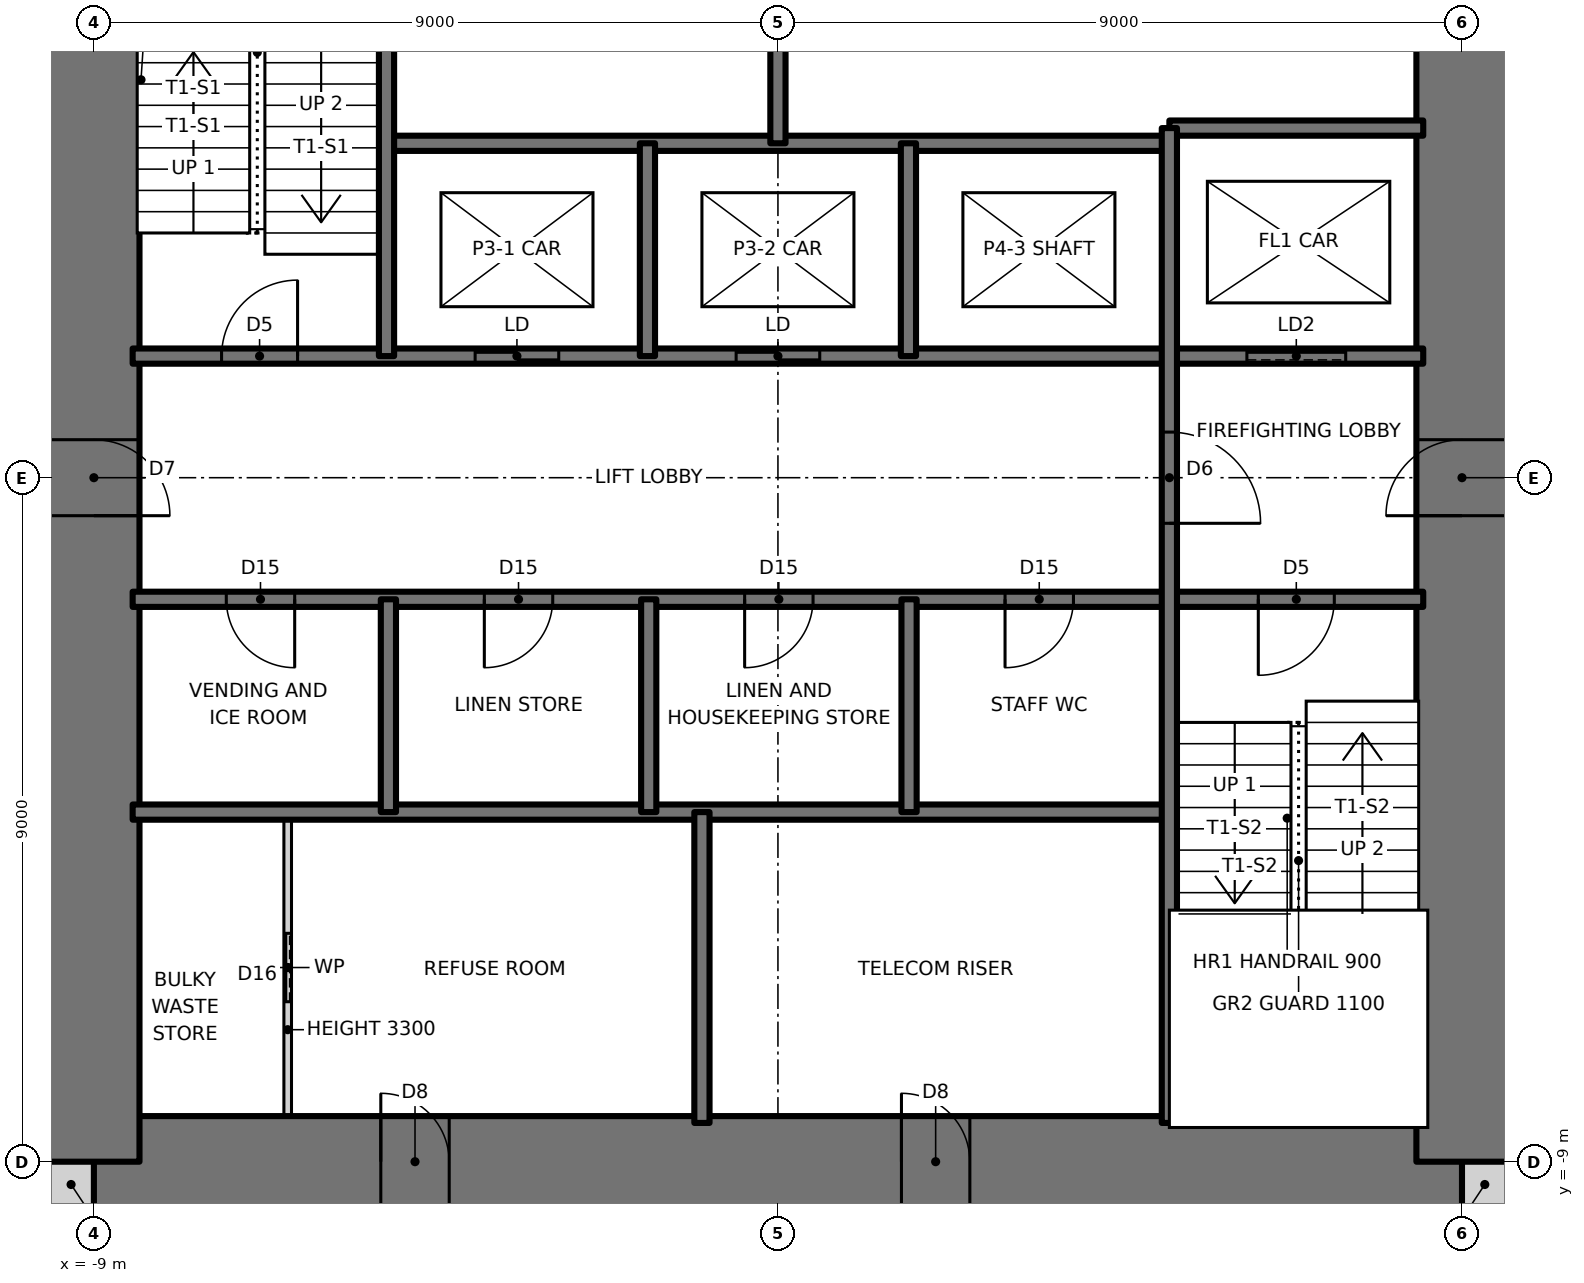
"""IFC4 building model, lengths in metres.
Left out: names, types, materials, properties, quantities, classifications, styles, units other than length and angle.
Written with IfcOpenShell. Run it as: python <this file> out.ifc"""

import sys

from ifc_helpers import new_model, si_unit, direction, frame, frame_2d, origin, place, context, subcontext, project, spatial, rectangle, extrude, element, fill, save


model = new_model("IFC4")
c1 = context("Model", 3, precision=1e-05, world=origin(), true_north=direction((0.0, 1.0)))
c2 = subcontext(c1, "Body", "Model", "MODEL_VIEW")
j1 = project(units=[si_unit("LENGTHUNIT", "METRE"), si_unit("PLANEANGLEUNIT", "RADIAN")], contexts=[c1])
p1 = place(None, origin())
s1 = spatial("IfcSite", under=j1, at=p1, CompositionType="ELEMENT")
p2 = place(p1, origin())
s2 = spatial("IfcBuilding", under=s1, at=p2, CompositionType="ELEMENT")
p3 = place(p2, frame((0.0, 0.0, 160.0)))
s3 = spatial("IfcBuildingStorey", under=s2, at=p3, CompositionType="ELEMENT", Elevation=160.0)
for number, where, z_axis, x_axis in (
    (1, (-9.6, -9.3, 0.0), (0.0, 0.0, 1.0), (1.0, 0.0, 0.0)),
    (2, (9.0, -9.3, 0.0), (0.0, 0.0, 1.0), (1.0, 0.0, 0.0)),
):
    element("IfcWall", number, at=place(p3, frame(where, z_axis=z_axis, x_axis=x_axis)), inside=s3, PredefinedType="SOLIDWALL", context=c2, shape_type="SweptSolid", body=[
        extrude(rectangle(XDim=0.6, YDim=0.6, at=frame_2d((0.3, 0.0))), origin(), (0.0, 0.0, 1.0), 3.5),
    ])
p4 = place(p3, frame((-9.0, -9.0, 0.0), z_axis=(0.0, 0.0, 1.0), x_axis=(1.0, 0.0, 0.0)))
e3 = element("IfcWall", 3, at=p4, inside=s3, PredefinedType="SHEAR", context=c2, shape_type="SweptSolid", body=[
    extrude(rectangle(XDim=18.0, YDim=1.2, at=frame_2d((9.0, 0.0))), origin(), (0.0, 0.0, 1.0), 3.5),
])
p5 = place(p4, frame((3.775, 0.0, 0.0)))
e4 = element("IfcOpeningElement", 4, at=p5, cuts=e3, PredefinedType="OPENING", context=c2, shape_type="SweptSolid", body=[
    extrude(rectangle(XDim=0.9, YDim=2.1, at=frame_2d((0.45, 1.05))), frame((0.0, 0.61, 0.0), z_axis=(0.0, -1.0, 0.0), x_axis=(1.0, 0.0, 0.0)), (0.0, 0.0, 1.0), 1.22),
])
p6 = place(p4, frame((10.625, 0.0, 0.0)))
e5 = element("IfcOpeningElement", 5, at=p6, cuts=e3, PredefinedType="OPENING", context=c2, shape_type="SweptSolid", body=[
    extrude(rectangle(XDim=0.9, YDim=2.1, at=frame_2d((0.45, 1.05))), frame((0.0, 0.61, 0.0), z_axis=(0.0, -1.0, 0.0), x_axis=(1.0, 0.0, 0.0)), (0.0, 0.0, 1.0), 1.22),
])
p7 = place(p3, frame((9.0, -9.0, 0.0), z_axis=(0.0, 0.0, 1.0), x_axis=(0.0, 1.0, 0.0)))
e6 = element("IfcWall", 6, at=p7, inside=s3, PredefinedType="SHEAR", context=c2, shape_type="SweptSolid", body=[
    extrude(rectangle(XDim=18.0, YDim=1.2, at=frame_2d((9.0, 0.0))), origin(), (0.0, 0.0, 1.0), 3.5),
])
p8 = place(p7, frame((8.5, 0.0, 0.0)))
e7 = element("IfcOpeningElement", 7, at=p8, cuts=e6, PredefinedType="OPENING", context=c2, shape_type="SweptSolid", body=[
    extrude(rectangle(XDim=1.0, YDim=2.1, at=frame_2d((0.5, 1.05))), frame((0.0, 0.61, 0.0), z_axis=(0.0, -1.0, 0.0), x_axis=(1.0, 0.0, 0.0)), (0.0, 0.0, 1.0), 1.22),
])
p9 = place(p3, frame((-9.0, 9.0, 0.0), z_axis=(0.0, 0.0, 1.0), x_axis=(0.0, -1.0, 0.0)))
e8 = element("IfcWall", 8, at=p9, inside=s3, PredefinedType="SHEAR", context=c2, shape_type="SweptSolid", body=[
    extrude(rectangle(XDim=18.0, YDim=1.2, at=frame_2d((9.0, 0.0))), origin(), (0.0, 0.0, 1.0), 3.5),
])
p10 = place(p9, frame((8.5, 0.0, 0.0)))
e9 = element("IfcOpeningElement", 9, at=p10, cuts=e8, PredefinedType="OPENING", context=c2, shape_type="SweptSolid", body=[
    extrude(rectangle(XDim=1.0, YDim=2.1, at=frame_2d((0.5, 1.05))), frame((0.0, 0.61, 0.0), z_axis=(0.0, -1.0, 0.0), x_axis=(1.0, 0.0, 0.0)), (0.0, 0.0, 1.0), 1.22),
])
p11 = place(p3, frame((-8.49, -4.4, 0.0), z_axis=(0.0, 0.0, 1.0), x_axis=(1.0, 0.0, 0.0)))
e10 = element("IfcWall", 10, at=p11, inside=s3, PredefinedType="SOLIDWALL", context=c2, shape_type="SweptSolid", body=[
    extrude(rectangle(XDim=13.64, YDim=0.2, at=frame_2d((6.82, 0.0))), origin(), (0.0, 0.0, 1.0), 3.5),
])
p12 = place(p3, frame((-8.49, -1.6, 0.0), z_axis=(0.0, 0.0, 1.0), x_axis=(1.0, 0.0, 0.0)))
e11 = element("IfcWall", 11, at=p12, inside=s3, PredefinedType="SOLIDWALL", context=c2, shape_type="SweptSolid", body=[
    extrude(rectangle(XDim=16.98, YDim=0.2, at=frame_2d((8.49, 0.0))), origin(), (0.0, 0.0, 1.0), 3.5),
])
p13 = place(p12, frame((14.81, 0.0, 0.0)))
e12 = element("IfcOpeningElement", 12, at=p13, cuts=e11, PredefinedType="OPENING", context=c2, shape_type="SweptSolid", body=[
    extrude(rectangle(XDim=1.0, YDim=2.1, at=frame_2d((0.5, 1.05))), frame((0.0, 0.11, 0.0), z_axis=(0.0, -1.0, 0.0), x_axis=(1.0, 0.0, 0.0)), (0.0, 0.0, 1.0), 0.22),
])
p14 = place(p12, frame((1.232, 0.0, 0.0)))
e13 = element("IfcOpeningElement", 13, at=p14, cuts=e11, PredefinedType="OPENING", context=c2, shape_type="SweptSolid", body=[
    extrude(rectangle(XDim=0.9, YDim=2.1, at=frame_2d((0.45, 1.05))), frame((0.0, 0.11, 0.0), z_axis=(0.0, -1.0, 0.0), x_axis=(1.0, 0.0, 0.0)), (0.0, 0.0, 1.0), 0.22),
])
p15 = place(p12, frame((4.627, 0.0, 0.0)))
e14 = element("IfcOpeningElement", 14, at=p15, cuts=e11, PredefinedType="OPENING", context=c2, shape_type="SweptSolid", body=[
    extrude(rectangle(XDim=0.9, YDim=2.1, at=frame_2d((0.45, 1.05))), frame((0.0, 0.11, 0.0), z_axis=(0.0, -1.0, 0.0), x_axis=(1.0, 0.0, 0.0)), (0.0, 0.0, 1.0), 0.22),
])
p16 = place(p12, frame((8.052, 0.0, 0.0)))
e15 = element("IfcOpeningElement", 15, at=p16, cuts=e11, PredefinedType="OPENING", context=c2, shape_type="SweptSolid", body=[
    extrude(rectangle(XDim=0.9, YDim=2.1, at=frame_2d((0.45, 1.05))), frame((0.0, 0.11, 0.0), z_axis=(0.0, -1.0, 0.0), x_axis=(1.0, 0.0, 0.0)), (0.0, 0.0, 1.0), 0.22),
])
p17 = place(p12, frame((11.478, 0.0, 0.0)))
e16 = element("IfcOpeningElement", 16, at=p17, cuts=e11, PredefinedType="OPENING", context=c2, shape_type="SweptSolid", body=[
    extrude(rectangle(XDim=0.9, YDim=2.1, at=frame_2d((0.45, 1.05))), frame((0.0, 0.11, 0.0), z_axis=(0.0, -1.0, 0.0), x_axis=(1.0, 0.0, 0.0)), (0.0, 0.0, 1.0), 0.22),
])
p18 = place(p3, frame((-8.49, 1.6, 0.0), z_axis=(0.0, 0.0, 1.0), x_axis=(1.0, 0.0, 0.0)))
e17 = element("IfcWall", 17, at=p18, inside=s3, PredefinedType="SOLIDWALL", context=c2, shape_type="SweptSolid", body=[
    extrude(rectangle(XDim=16.98, YDim=0.2, at=frame_2d((8.49, 0.0))), origin(), (0.0, 0.0, 1.0), 3.5),
])
p19 = place(p18, frame((1.17, 0.0, 0.0)))
e18 = element("IfcOpeningElement", 18, at=p19, cuts=e17, PredefinedType="OPENING", context=c2, shape_type="SweptSolid", body=[
    extrude(rectangle(XDim=1.0, YDim=2.1, at=frame_2d((0.5, 1.05))), frame((0.0, 0.11, 0.0), z_axis=(0.0, -1.0, 0.0), x_axis=(1.0, 0.0, 0.0)), (0.0, 0.0, 1.0), 0.22),
])
p20 = place(p18, frame((4.506, 0.0, 0.0)))
e19 = element("IfcOpeningElement", 19, at=p20, cuts=e17, PredefinedType="OPENING", context=c2, shape_type="SweptSolid", body=[
    extrude(rectangle(XDim=1.1, YDim=2.1, at=frame_2d((0.55, 1.05))), frame((0.0, 0.11, 0.0), z_axis=(0.0, -1.0, 0.0), x_axis=(1.0, 0.0, 0.0)), (0.0, 0.0, 1.0), 0.22),
])
p21 = place(p18, frame((7.94, 0.0, 0.0)))
e20 = element("IfcOpeningElement", 20, at=p21, cuts=e17, PredefinedType="OPENING", context=c2, shape_type="SweptSolid", body=[
    extrude(rectangle(XDim=1.1, YDim=2.1, at=frame_2d((0.55, 1.05))), frame((0.0, 0.11, 0.0), z_axis=(0.0, -1.0, 0.0), x_axis=(1.0, 0.0, 0.0)), (0.0, 0.0, 1.0), 0.22),
])
p22 = place(p18, frame((14.66, 0.0, 0.0)))
e21 = element("IfcOpeningElement", 21, at=p22, cuts=e17, PredefinedType="OPENING", context=c2, shape_type="SweptSolid", body=[
    extrude(rectangle(XDim=1.3, YDim=2.1, at=frame_2d((0.65, 1.05))), frame((0.0, 0.11, 0.0), z_axis=(0.0, -1.0, 0.0), x_axis=(1.0, 0.0, 0.0)), (0.0, 0.0, 1.0), 0.22),
])
p23 = place(p3, frame((-5.15, 4.4, 0.0), z_axis=(0.0, 0.0, 1.0), x_axis=(1.0, 0.0, 0.0)))
e22 = element("IfcWall", 22, at=p23, inside=s3, PredefinedType="SOLIDWALL", context=c2, shape_type="SweptSolid", body=[
    extrude(rectangle(XDim=10.3, YDim=0.2, at=frame_2d((5.15, 0.0))), origin(), (0.0, 0.0, 1.0), 3.5),
])
p24 = place(p3, frame((5.15, 4.6, 0.0), z_axis=(0.0, 0.0, 1.0), x_axis=(1.0, 0.0, 0.0)))
e23 = element("IfcWall", 23, at=p24, inside=s3, PredefinedType="SOLIDWALL", context=c2, shape_type="SweptSolid", body=[
    extrude(rectangle(XDim=3.34, YDim=0.2, at=frame_2d((1.67, 0.0))), origin(), (0.0, 0.0, 1.0), 3.5),
])
p25 = place(p3, frame((5.15, -8.49, 0.0), z_axis=(0.0, 0.0, 1.0), x_axis=(0.0, 1.0, 0.0)))
e24 = element("IfcWall", 24, at=p25, inside=s3, PredefinedType="SOLIDWALL", context=c2, shape_type="SweptSolid", body=[
    extrude(rectangle(XDim=13.09, YDim=0.2, at=frame_2d((6.545, 0.0))), origin(), (0.0, 0.0, 1.0), 3.5),
])
p26 = place(p25, frame((7.89, 0.0, 0.0)))
e25 = element("IfcOpeningElement", 25, at=p26, cuts=e24, PredefinedType="OPENING", context=c2, shape_type="SweptSolid", body=[
    extrude(rectangle(XDim=1.2, YDim=2.1, at=frame_2d((0.6, 1.05))), frame((0.0, 0.11, 0.0), z_axis=(0.0, -1.0, 0.0), x_axis=(1.0, 0.0, 0.0)), (0.0, 0.0, 1.0), 0.22),
])
for number, where, z_axis, x_axis in (
    (26, (1.725, -4.4, 0.0), (0.0, 0.0, 1.0), (0.0, 1.0, 0.0)),
    (27, (1.717, 1.6, 0.0), (0.0, 0.0, 1.0), (0.0, 1.0, 0.0)),
):
    element("IfcWall", number, at=place(p3, frame(where, z_axis=z_axis, x_axis=x_axis)), inside=s3, PredefinedType="SOLIDWALL", context=c2, shape_type="SweptSolid", body=[
        extrude(rectangle(XDim=2.8, YDim=0.2, at=frame_2d((1.4, 0.0))), origin(), (0.0, 0.0, 1.0), 3.5),
    ])
for number, where, z_axis, x_axis in (
    (28, (0.0, 4.4, 0.0), (0.0, 0.0, 1.0), (0.0, 1.0, 0.0)),
    (29, (-1.0, -8.49, 0.0), (0.0, 0.0, 1.0), (0.0, 1.0, 0.0)),
):
    element("IfcWall", number, at=place(p3, frame(where, z_axis=z_axis, x_axis=x_axis)), inside=s3, PredefinedType="SOLIDWALL", context=c2, shape_type="SweptSolid", body=[
        extrude(rectangle(XDim=4.09, YDim=0.2, at=frame_2d((2.045, 0.0))), origin(), (0.0, 0.0, 1.0), 3.5),
    ])
for number, where, z_axis, x_axis in (
    (30, (-1.7, -4.4, 0.0), (0.0, 0.0, 1.0), (0.0, 1.0, 0.0)),
    (31, (-1.717, 1.6, 0.0), (0.0, 0.0, 1.0), (0.0, 1.0, 0.0)),
    (32, (-5.125, -4.4, 0.0), (0.0, 0.0, 1.0), (0.0, 1.0, 0.0)),
):
    element("IfcWall", number, at=place(p3, frame(where, z_axis=z_axis, x_axis=x_axis)), inside=s3, PredefinedType="SOLIDWALL", context=c2, shape_type="SweptSolid", body=[
        extrude(rectangle(XDim=2.8, YDim=0.2, at=frame_2d((1.4, 0.0))), origin(), (0.0, 0.0, 1.0), 3.5),
    ])
p27 = place(p3, frame((-5.15, 1.6, 0.0), z_axis=(0.0, 0.0, 1.0), x_axis=(0.0, 1.0, 0.0)))
e33 = element("IfcWall", 33, at=p27, inside=s3, PredefinedType="SOLIDWALL", context=c2, shape_type="SweptSolid", body=[
    extrude(rectangle(XDim=6.89, YDim=0.2, at=frame_2d((3.445, 0.0))), origin(), (0.0, 0.0, 1.0), 3.5),
])
p28 = place(p3, frame((-6.45, -8.49, 0.0), z_axis=(0.0, 0.0, 1.0), x_axis=(0.0, 1.0, 0.0)))
e34 = element("IfcWall", 34, at=p28, inside=s3, PredefinedType="PARTITIONING", context=c2, shape_type="SweptSolid", body=[
    extrude(rectangle(XDim=4.09, YDim=0.1, at=frame_2d((2.045, 0.0))), origin(), (0.0, 0.0, 1.0), 3.3),
])
p29 = place(p28, frame((1.595, 0.0, 0.0)))
e35 = element("IfcOpeningElement", 35, at=p29, cuts=e34, PredefinedType="OPENING", context=c2, shape_type="SweptSolid", body=[
    extrude(rectangle(XDim=0.9, YDim=2.1, at=frame_2d((0.45, 1.05))), frame((0.0, 0.06, 0.0), z_axis=(0.0, -1.0, 0.0), x_axis=(1.0, 0.0, 0.0)), (0.0, 0.0, 1.0), 0.12),
])
p30 = place(p19, origin())
e36 = element("IfcDoor", 36, at=p30, inside=s3, OperationType="SINGLE_SWING_RIGHT", PredefinedType="DOOR", context=c2, shape_type="SweptSolid", body=[
    extrude(rectangle(XDim=1.0, YDim=2.1, at=frame_2d((0.5, 1.05))), frame((0.0, 0.025, 0.0), z_axis=(0.0, -1.0, 0.0), x_axis=(1.0, 0.0, 0.0)), (0.0, 0.0, 1.0), 0.05),
])
fill(e18, e36)
p31 = place(p13, frame((1.0, 0.0, 0.0), z_axis=(0.0, 0.0, 1.0), x_axis=(-1.0, 0.0, 0.0)))
e37 = element("IfcDoor", 37, at=p31, inside=s3, OperationType="SINGLE_SWING_RIGHT", PredefinedType="DOOR", context=c2, shape_type="SweptSolid", body=[
    extrude(rectangle(XDim=1.0, YDim=2.1, at=frame_2d((0.5, 1.05))), frame((0.0, 0.025, 0.0), z_axis=(0.0, -1.0, 0.0), x_axis=(1.0, 0.0, 0.0)), (0.0, 0.0, 1.0), 0.05),
])
fill(e12, e37)
p32 = place(p26, frame((1.2, 0.0, 0.0), z_axis=(0.0, 0.0, 1.0), x_axis=(-1.0, 0.0, 0.0)))
e38 = element("IfcDoor", 38, at=p32, inside=s3, OperationType="SINGLE_SWING_RIGHT", PredefinedType="DOOR", context=c2, shape_type="SweptSolid", body=[
    extrude(rectangle(XDim=1.2, YDim=2.1, at=frame_2d((0.6, 1.05))), frame((0.0, 0.025, 0.0), z_axis=(0.0, -1.0, 0.0), x_axis=(1.0, 0.0, 0.0)), (0.0, 0.0, 1.0), 0.05),
])
fill(e25, e38)
p33 = place(p14, frame((0.9, 0.0, 0.0), z_axis=(0.0, 0.0, 1.0), x_axis=(-1.0, 0.0, 0.0)))
e39 = element("IfcDoor", 39, at=p33, inside=s3, OperationType="SINGLE_SWING_LEFT", PredefinedType="DOOR", context=c2, shape_type="SweptSolid", body=[
    extrude(rectangle(XDim=0.9, YDim=2.1, at=frame_2d((0.45, 1.05))), frame((0.0, 0.025, 0.0), z_axis=(0.0, -1.0, 0.0), x_axis=(1.0, 0.0, 0.0)), (0.0, 0.0, 1.0), 0.05),
])
fill(e13, e39)
p34 = place(p15, frame((0.9, 0.0, 0.0), z_axis=(0.0, 0.0, 1.0), x_axis=(-1.0, 0.0, 0.0)))
e40 = element("IfcDoor", 40, at=p34, inside=s3, OperationType="SINGLE_SWING_RIGHT", PredefinedType="DOOR", context=c2, shape_type="SweptSolid", body=[
    extrude(rectangle(XDim=0.9, YDim=2.1, at=frame_2d((0.45, 1.05))), frame((0.0, 0.025, 0.0), z_axis=(0.0, -1.0, 0.0), x_axis=(1.0, 0.0, 0.0)), (0.0, 0.0, 1.0), 0.05),
])
fill(e14, e40)
p35 = place(p16, frame((0.9, 0.0, 0.0), z_axis=(0.0, 0.0, 1.0), x_axis=(-1.0, 0.0, 0.0)))
e41 = element("IfcDoor", 41, at=p35, inside=s3, OperationType="SINGLE_SWING_RIGHT", PredefinedType="DOOR", context=c2, shape_type="SweptSolid", body=[
    extrude(rectangle(XDim=0.9, YDim=2.1, at=frame_2d((0.45, 1.05))), frame((0.0, 0.025, 0.0), z_axis=(0.0, -1.0, 0.0), x_axis=(1.0, 0.0, 0.0)), (0.0, 0.0, 1.0), 0.05),
])
fill(e15, e41)
p36 = place(p17, frame((0.9, 0.0, 0.0), z_axis=(0.0, 0.0, 1.0), x_axis=(-1.0, 0.0, 0.0)))
e42 = element("IfcDoor", 42, at=p36, inside=s3, OperationType="SINGLE_SWING_RIGHT", PredefinedType="DOOR", context=c2, shape_type="SweptSolid", body=[
    extrude(rectangle(XDim=0.9, YDim=2.1, at=frame_2d((0.45, 1.05))), frame((0.0, 0.025, 0.0), z_axis=(0.0, -1.0, 0.0), x_axis=(1.0, 0.0, 0.0)), (0.0, 0.0, 1.0), 0.05),
])
fill(e16, e42)
p37 = place(p29, origin())
e43 = element("IfcDoor", 43, at=p37, inside=s3, OperationType="SLIDING_TO_LEFT", PredefinedType="DOOR", context=c2, shape_type="SweptSolid", body=[
    extrude(rectangle(XDim=0.9, YDim=2.1, at=frame_2d((0.45, 1.05))), frame((0.0, 0.025, 0.0), z_axis=(0.0, -1.0, 0.0), x_axis=(1.0, 0.0, 0.0)), (0.0, 0.0, 1.0), 0.05),
])
fill(e35, e43)
p38 = place(p10, origin())
e44 = element("IfcDoor", 44, at=p38, inside=s3, OperationType="SINGLE_SWING_RIGHT", PredefinedType="DOOR", context=c2, shape_type="SweptSolid", body=[
    extrude(rectangle(XDim=1.0, YDim=2.1, at=frame_2d((0.5, 1.05))), frame((0.0, 0.025, 0.0), z_axis=(0.0, -1.0, 0.0), x_axis=(1.0, 0.0, 0.0)), (0.0, 0.0, 1.0), 0.05),
])
fill(e9, e44)
p39 = place(p8, origin())
e45 = element("IfcDoor", 45, at=p39, inside=s3, OperationType="SINGLE_SWING_LEFT", PredefinedType="DOOR", context=c2, shape_type="SweptSolid", body=[
    extrude(rectangle(XDim=1.0, YDim=2.1, at=frame_2d((0.5, 1.05))), frame((0.0, 0.025, 0.0), z_axis=(0.0, -1.0, 0.0), x_axis=(1.0, 0.0, 0.0)), (0.0, 0.0, 1.0), 0.05),
])
fill(e7, e45)
p40 = place(p5, origin())
e46 = element("IfcDoor", 46, at=p40, inside=s3, OperationType="SINGLE_SWING_LEFT", PredefinedType="DOOR", context=c2, shape_type="SweptSolid", body=[
    extrude(rectangle(XDim=0.9, YDim=2.1, at=frame_2d((0.45, 1.05))), frame((0.0, 0.025, 0.0), z_axis=(0.0, -1.0, 0.0), x_axis=(1.0, 0.0, 0.0)), (0.0, 0.0, 1.0), 0.05),
])
fill(e4, e46)
p41 = place(p6, origin())
e47 = element("IfcDoor", 47, at=p41, inside=s3, OperationType="SINGLE_SWING_LEFT", PredefinedType="DOOR", context=c2, shape_type="SweptSolid", body=[
    extrude(rectangle(XDim=0.9, YDim=2.1, at=frame_2d((0.45, 1.05))), frame((0.0, 0.025, 0.0), z_axis=(0.0, -1.0, 0.0), x_axis=(1.0, 0.0, 0.0)), (0.0, 0.0, 1.0), 0.05),
])
fill(e5, e47)
p42 = place(p20, origin())
e48 = element("IfcDoor", 48, at=p42, inside=s3, OperationType="DOUBLE_DOOR_SLIDING", PredefinedType="DOOR", context=c2, shape_type="SweptSolid", body=[
    extrude(rectangle(XDim=1.1, YDim=2.1, at=frame_2d((0.55, 1.05))), frame((0.0, 0.025, 0.0), z_axis=(0.0, -1.0, 0.0), x_axis=(1.0, 0.0, 0.0)), (0.0, 0.0, 1.0), 0.05),
])
fill(e19, e48)
p43 = place(p21, origin())
e49 = element("IfcDoor", 49, at=p43, inside=s3, OperationType="DOUBLE_DOOR_SLIDING", PredefinedType="DOOR", context=c2, shape_type="SweptSolid", body=[
    extrude(rectangle(XDim=1.1, YDim=2.1, at=frame_2d((0.55, 1.05))), frame((0.0, 0.025, 0.0), z_axis=(0.0, -1.0, 0.0), x_axis=(1.0, 0.0, 0.0)), (0.0, 0.0, 1.0), 0.05),
])
fill(e20, e49)
p44 = place(p22, origin())
e50 = element("IfcDoor", 50, at=p44, inside=s3, OperationType="SLIDING_TO_LEFT", PredefinedType="DOOR", context=c2, shape_type="SweptSolid", body=[
    extrude(rectangle(XDim=1.3, YDim=2.1, at=frame_2d((0.65, 1.05))), frame((0.0, 0.025, 0.0), z_axis=(0.0, -1.0, 0.0), x_axis=(1.0, 0.0, 0.0)), (0.0, 0.0, 1.0), 0.05),
])
fill(e21, e50)
save(model, sys.argv[1])
